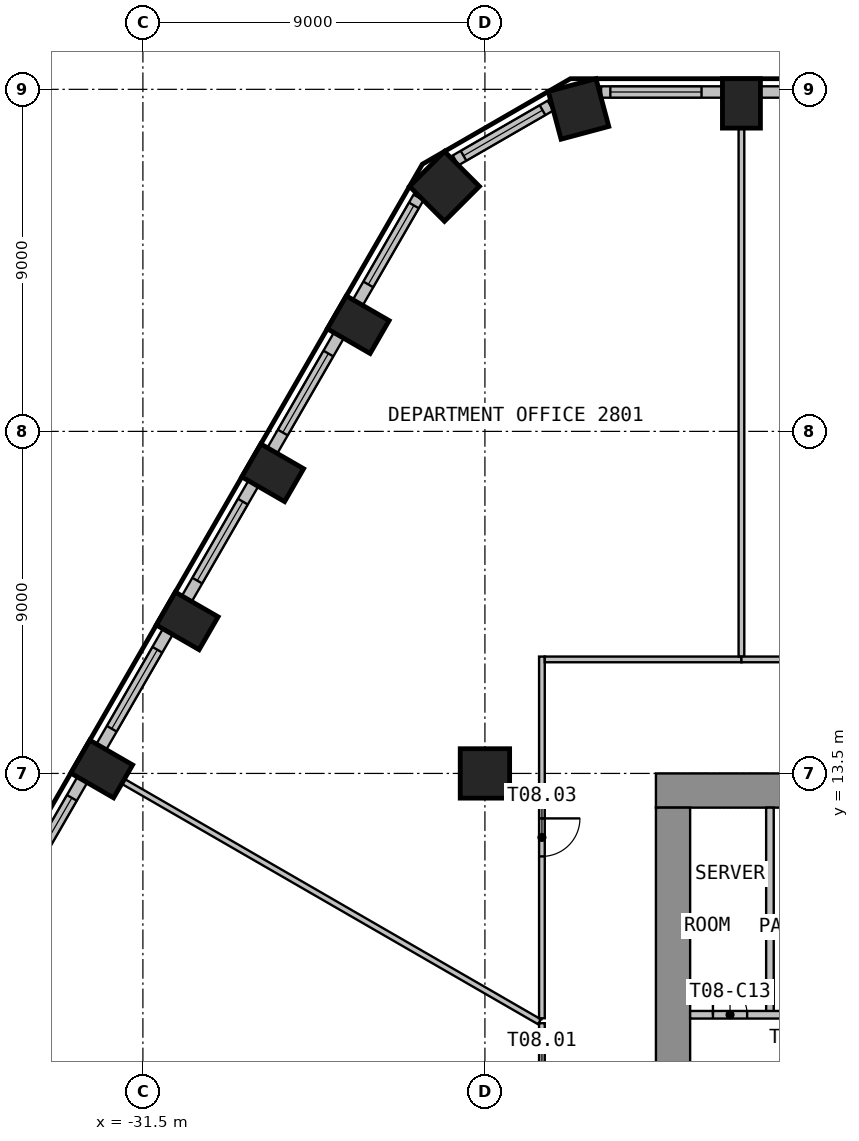
"""IFC4 building model, lengths in metres.
Left out: names, types, materials, properties, quantities, classifications, styles, units other than length and angle.
Written with IfcOpenShell. Run it as: python <this file> out.ifc"""

import sys

from ifc_helpers import new_model, si_unit, direction, frame, frame_2d, origin, origin_2d, place, context, subcontext, project, spatial, rectangle, circle, extrude, element, fill, save


model = new_model("IFC4")
c1 = context("Model", 3, precision=1e-05, world=origin(), true_north=direction((0.0, 1.0)))
c2 = subcontext(c1, "Body", "Model", "MODEL_VIEW")
j1 = project(units=[si_unit("LENGTHUNIT", "METRE"), si_unit("PLANEANGLEUNIT", "RADIAN")], contexts=[c1])
p1 = place(None, origin())
s1 = spatial("IfcSite", under=j1, at=p1, CompositionType="ELEMENT")
p2 = place(p1, origin())
s2 = spatial("IfcBuilding", under=s1, at=p2, CompositionType="ELEMENT")
p3 = place(p2, frame((0.0, 0.0, 116.4)))
s3 = spatial("IfcBuildingStorey", under=s2, at=p3, CompositionType="ELEMENT", Elevation=116.4)
p4 = place(p3, frame((-15.75, 31.13, 0.0), z_axis=(0.0, 0.0, 1.0), x_axis=(-1.0, 0.0, 0.0)))
e1 = element("IfcColumn", 1, at=p4, inside=s3, PredefinedType="COLUMN", context=c2, shape_type="SweptSolid", body=[
    extrude(rectangle(XDim=1.0, YDim=1.3, at=origin_2d()), origin(), (0.0, 0.0, 1.0), 3.525),
])
for number, where, z_axis, x_axis in (
    (2, (-20.037, 30.984, 0.0), (0.0, 0.0, 1.0), (-0.966, -0.259, 0.0)),
    (3, (-23.564, 28.947, 0.0), (0.0, 0.0, 1.0), (-0.707, -0.707, 0.0)),
):
    element("IfcColumn", number, at=place(p3, frame(where, z_axis=z_axis, x_axis=x_axis)), inside=s3, PredefinedType="COLUMN", context=c2, shape_type="SweptSolid", body=[
        extrude(rectangle(XDim=1.3, YDim=1.3, at=origin_2d()), origin(), (0.0, 0.0, 1.0), 3.525),
    ])
for number, where, z_axis, x_axis in (
    (4, (-25.834, 25.308, 0.0), (0.0, 0.0, 1.0), (-0.5, -0.866, 0.0)),
    (5, (-28.084, 21.411, 0.0), (0.0, 0.0, 1.0), (-0.5, -0.866, 0.0)),
    (6, (-30.334, 17.513, 0.0), (0.0, 0.0, 1.0), (-0.5, -0.866, 0.0)),
    (7, (-32.584, 13.616, 0.0), (0.0, 0.0, 1.0), (-0.5, -0.866, 0.0)),
):
    element("IfcColumn", number, at=place(p3, frame(where, z_axis=z_axis, x_axis=x_axis)), inside=s3, PredefinedType="COLUMN", context=c2, shape_type="SweptSolid", body=[
        extrude(rectangle(XDim=1.0, YDim=1.3, at=origin_2d()), origin(), (0.0, 0.0, 1.0), 3.525),
    ])
p5 = place(p3, frame((-22.5, 13.5, 0.0), z_axis=(0.0, 0.0, 1.0), x_axis=(1.0, 0.0, 0.0)))
e8 = element("IfcColumn", 8, at=p5, inside=s3, PredefinedType="COLUMN", context=c2, shape_type="SweptSolid", body=[
    extrude(circle(Radius=0.65, at=origin_2d()), origin(), (0.0, 0.0, 1.0), 3.525),
])
p6 = place(p3, frame((-11.75, 31.43, 0.0), z_axis=(0.0, 0.0, 1.0), x_axis=(-1.0, 0.0, 0.0)))
e9 = element("IfcWall", 9, at=p6, inside=s3, PredefinedType="SOLIDWALL", context=c2, shape_type="SweptSolid", body=[
    extrude(rectangle(XDim=3.499, YDim=0.3, at=frame_2d((1.75, 0.0))), origin(), (0.0, 0.0, 1.0), 3.525),
])
p7 = place(p6, frame((0.55, 0.0, 0.9)))
e10 = element("IfcOpeningElement", 10, at=p7, cuts=e9, PredefinedType="OPENING", context=c2, shape_type="SweptSolid", body=[
    extrude(rectangle(XDim=2.4, YDim=2.1, at=frame_2d((1.2, 1.05))), frame((0.0, 0.16, 0.0), z_axis=(0.0, -1.0, 0.0), x_axis=(1.0, 0.0, 0.0)), (0.0, 0.0, 1.0), 0.32),
])
p8 = place(p3, frame((-16.25, 31.43, 0.0), z_axis=(0.0, 0.0, 1.0), x_axis=(-1.0, 0.0, 0.0)))
e11 = element("IfcWall", 11, at=p8, inside=s3, PredefinedType="SOLIDWALL", context=c2, shape_type="SweptSolid", body=[
    extrude(rectangle(XDim=3.192, YDim=0.3, at=frame_2d((1.596, 0.0))), origin(), (0.0, 0.0, 1.0), 3.525),
])
p9 = place(p8, frame((0.55, 0.0, 0.9)))
e12 = element("IfcOpeningElement", 12, at=p9, cuts=e11, PredefinedType="OPENING", context=c2, shape_type="SweptSolid", body=[
    extrude(rectangle(XDim=2.4, YDim=2.1, at=frame_2d((1.2, 1.05))), frame((0.0, 0.16, 0.0), z_axis=(0.0, -1.0, 0.0), x_axis=(1.0, 0.0, 0.0)), (0.0, 0.0, 1.0), 0.32),
])
p10 = place(p3, frame((-20.774, 31.073, 0.0), z_axis=(0.0, 0.0, 1.0), x_axis=(-0.866053149362, -0.49995194017, 0.0)))
e13 = element("IfcWall", 13, at=p10, inside=s3, PredefinedType="SOLIDWALL", context=c2, shape_type="SweptSolid", body=[
    extrude(rectangle(XDim=2.885, YDim=0.3, at=frame_2d((1.443, 0.0))), origin(), (0.0, 0.0, 1.0), 3.525),
])
p11 = place(p10, frame((0.243, 0.0, 0.9)))
e14 = element("IfcOpeningElement", 14, at=p11, cuts=e13, PredefinedType="OPENING", context=c2, shape_type="SweptSolid", body=[
    extrude(rectangle(XDim=2.4, YDim=2.1, at=frame_2d((1.2, 1.05))), frame((0.0, 0.16, 0.0), z_axis=(0.0, -1.0, 0.0), x_axis=(1.0, 0.0, 0.0)), (0.0, 0.0, 1.0), 0.32),
])
p12 = place(p3, frame((-24.248, 28.656, 0.0), z_axis=(0.0, 0.0, 1.0), x_axis=(-0.500004907028, -0.866022570692, 0.0)))
e15 = element("IfcWall", 15, at=p12, inside=s3, PredefinedType="SOLIDWALL", context=c2, shape_type="SweptSolid", body=[
    extrude(rectangle(XDim=3.192, YDim=0.3, at=frame_2d((1.596, 0.0))), origin(), (0.0, 0.0, 1.0), 3.525),
])
p13 = place(p12, frame((0.243, 0.0, 0.9)))
e16 = element("IfcOpeningElement", 16, at=p13, cuts=e15, PredefinedType="OPENING", context=c2, shape_type="SweptSolid", body=[
    extrude(rectangle(XDim=2.4, YDim=2.1, at=frame_2d((1.2, 1.05))), frame((0.0, 0.16, 0.0), z_axis=(0.0, -1.0, 0.0), x_axis=(1.0, 0.0, 0.0)), (0.0, 0.0, 1.0), 0.32),
])
p14 = place(p3, frame((-26.344, 25.024, 0.0), z_axis=(0.0, 0.0, 1.0), x_axis=(-0.499996256241, -0.866027565234, 0.0)))
e17 = element("IfcWall", 17, at=p14, inside=s3, PredefinedType="SOLIDWALL", context=c2, shape_type="SweptSolid", body=[
    extrude(rectangle(XDim=3.499, YDim=0.3, at=frame_2d((1.75, 0.0))), origin(), (0.0, 0.0, 1.0), 3.525),
])
p15 = place(p14, frame((0.55, 0.0, 0.9)))
e18 = element("IfcOpeningElement", 18, at=p15, cuts=e17, PredefinedType="OPENING", context=c2, shape_type="SweptSolid", body=[
    extrude(rectangle(XDim=2.4, YDim=2.1, at=frame_2d((1.2, 1.05))), frame((0.0, 0.16, 0.0), z_axis=(0.0, -1.0, 0.0), x_axis=(1.0, 0.0, 0.0)), (0.0, 0.0, 1.0), 0.32),
])
p16 = place(p3, frame((-28.594, 21.127, 0.0), z_axis=(0.0, 0.0, 1.0), x_axis=(-0.499996256241, -0.866027565234, 0.0)))
e19 = element("IfcWall", 19, at=p16, inside=s3, PredefinedType="SOLIDWALL", context=c2, shape_type="SweptSolid", body=[
    extrude(rectangle(XDim=3.499, YDim=0.3, at=frame_2d((1.75, 0.0))), origin(), (0.0, 0.0, 1.0), 3.525),
])
p17 = place(p16, frame((0.55, 0.0, 0.9)))
e20 = element("IfcOpeningElement", 20, at=p17, cuts=e19, PredefinedType="OPENING", context=c2, shape_type="SweptSolid", body=[
    extrude(rectangle(XDim=2.4, YDim=2.1, at=frame_2d((1.2, 1.05))), frame((0.0, 0.16, 0.0), z_axis=(0.0, -1.0, 0.0), x_axis=(1.0, 0.0, 0.0)), (0.0, 0.0, 1.0), 0.32),
])
p18 = place(p3, frame((-30.844, 17.23, 0.0), z_axis=(0.0, 0.0, 1.0), x_axis=(-0.499996256241, -0.866027565234, 0.0)))
e21 = element("IfcWall", 21, at=p18, inside=s3, PredefinedType="SOLIDWALL", context=c2, shape_type="SweptSolid", body=[
    extrude(rectangle(XDim=3.499, YDim=0.3, at=frame_2d((1.75, 0.0))), origin(), (0.0, 0.0, 1.0), 3.525),
])
p19 = place(p18, frame((0.55, 0.0, 0.9)))
e22 = element("IfcOpeningElement", 22, at=p19, cuts=e21, PredefinedType="OPENING", context=c2, shape_type="SweptSolid", body=[
    extrude(rectangle(XDim=2.4, YDim=2.1, at=frame_2d((1.2, 1.05))), frame((0.0, 0.16, 0.0), z_axis=(0.0, -1.0, 0.0), x_axis=(1.0, 0.0, 0.0)), (0.0, 0.0, 1.0), 0.32),
])
p20 = place(p3, frame((-33.094, 13.333, 0.0), z_axis=(0.0, 0.0, 1.0), x_axis=(-0.499996256241, -0.866027565234, 0.0)))
e23 = element("IfcWall", 23, at=p20, inside=s3, PredefinedType="SOLIDWALL", context=c2, shape_type="SweptSolid", body=[
    extrude(rectangle(XDim=3.499, YDim=0.3, at=frame_2d((1.75, 0.0))), origin(), (0.0, 0.0, 1.0), 3.525),
])
p21 = place(p20, frame((0.55, 0.0, 0.9)))
e24 = element("IfcOpeningElement", 24, at=p21, cuts=e23, PredefinedType="OPENING", context=c2, shape_type="SweptSolid", body=[
    extrude(rectangle(XDim=2.4, YDim=2.1, at=frame_2d((1.2, 1.05))), frame((0.0, 0.16, 0.0), z_axis=(0.0, -1.0, 0.0), x_axis=(1.0, 0.0, 0.0)), (0.0, 0.0, 1.0), 0.32),
])
p22 = place(p3, frame((-18.0, 13.05, 0.0), z_axis=(0.0, 0.0, 1.0), x_axis=(1.0, 0.0, 0.0)))
e25 = element("IfcWall", 25, at=p22, inside=s3, PredefinedType="SHEAR", context=c2, shape_type="SweptSolid", body=[
    extrude(rectangle(XDim=36.0, YDim=0.9, at=frame_2d((18.0, 0.0))), origin(), (0.0, 0.0, 1.0), 3.525),
])
p23 = place(p22, frame((16.8, 0.0, 0.0)))
e26 = element("IfcOpeningElement", 26, at=p23, cuts=e25, PredefinedType="OPENING", context=c2, shape_type="SweptSolid", body=[
    extrude(rectangle(XDim=2.4, YDim=2.1, at=frame_2d((1.2, 1.05))), frame((0.0, 0.46, 0.0), z_axis=(0.0, -1.0, 0.0), x_axis=(1.0, 0.0, 0.0)), (0.0, 0.0, 1.0), 0.92),
])
p24 = place(p22, frame((5.55, 0.0, 0.0)))
e27 = element("IfcOpeningElement", 27, at=p24, cuts=e25, PredefinedType="OPENING", context=c2, shape_type="SweptSolid", body=[
    extrude(rectangle(XDim=1.2, YDim=2.1, at=frame_2d((0.6, 1.05))), frame((0.0, 0.46, 0.0), z_axis=(0.0, -1.0, 0.0), x_axis=(1.0, 0.0, 0.0)), (0.0, 0.0, 1.0), 0.92),
])
p25 = place(p22, frame((29.25, 0.0, 0.0)))
e28 = element("IfcOpeningElement", 28, at=p25, cuts=e25, PredefinedType="OPENING", context=c2, shape_type="SweptSolid", body=[
    extrude(rectangle(XDim=1.2, YDim=2.1, at=frame_2d((0.6, 1.05))), frame((0.0, 0.46, 0.0), z_axis=(0.0, -1.0, 0.0), x_axis=(1.0, 0.0, 0.0)), (0.0, 0.0, 1.0), 0.92),
])
p26 = place(p3, frame((-17.55, -12.6, 0.0), z_axis=(0.0, 0.0, 1.0), x_axis=(0.0, 1.0, 0.0)))
e29 = element("IfcWall", 29, at=p26, inside=s3, PredefinedType="SHEAR", context=c2, shape_type="SweptSolid", body=[
    extrude(rectangle(XDim=25.2, YDim=0.9, at=frame_2d((12.6, 0.0))), origin(), (0.0, 0.0, 1.0), 3.525),
])
p27 = place(p26, frame((11.4, 0.0, 0.0)))
e30 = element("IfcOpeningElement", 30, at=p27, cuts=e29, PredefinedType="OPENING", context=c2, shape_type="SweptSolid", body=[
    extrude(rectangle(XDim=2.4, YDim=2.1, at=frame_2d((1.2, 1.05))), frame((0.0, 0.46, 0.0), z_axis=(0.0, -1.0, 0.0), x_axis=(1.0, 0.0, 0.0)), (0.0, 0.0, 1.0), 0.92),
])
p28 = place(p3, frame((-15.0, 7.15, 0.0), z_axis=(0.0, 0.0, 1.0), x_axis=(0.0, 1.0, 0.0)))
e31 = element("IfcWall", 31, at=p28, inside=s3, PredefinedType="PARTITIONING", context=c2, shape_type="SweptSolid", body=[
    extrude(rectangle(XDim=5.45, YDim=0.2, at=frame_2d((2.725, 0.0))), origin(), (0.0, 0.0, 1.0), 3.525),
])
p29 = place(p3, frame((-17.1, 7.15, 0.0), z_axis=(0.0, 0.0, 1.0), x_axis=(1.0, 0.0, 0.0)))
e32 = element("IfcWall", 32, at=p29, inside=s3, PredefinedType="PARTITIONING", context=c2, shape_type="SweptSolid", body=[
    extrude(rectangle(XDim=4.2, YDim=0.2, at=frame_2d((2.1, 0.0))), origin(), (0.0, 0.0, 1.0), 3.525),
])
p30 = place(p29, frame((0.6, 0.0, 0.0)))
e33 = element("IfcOpeningElement", 33, at=p30, cuts=e32, PredefinedType="OPENING", context=c2, shape_type="SweptSolid", body=[
    extrude(rectangle(XDim=0.9, YDim=2.1, at=frame_2d((0.45, 1.05))), frame((0.0, 0.11, 0.0), z_axis=(0.0, -1.0, 0.0), x_axis=(1.0, 0.0, 0.0)), (0.0, 0.0, 1.0), 0.22),
])
p31 = place(p29, frame((2.7, 0.0, 0.0)))
e34 = element("IfcOpeningElement", 34, at=p31, cuts=e32, PredefinedType="OPENING", context=c2, shape_type="SweptSolid", body=[
    extrude(rectangle(XDim=0.9, YDim=2.1, at=frame_2d((0.45, 1.05))), frame((0.0, 0.11, 0.0), z_axis=(0.0, -1.0, 0.0), x_axis=(1.0, 0.0, 0.0)), (0.0, 0.0, 1.0), 0.22),
])
p32 = place(p3, frame((-32.004, 13.281, 0.0), z_axis=(0.0, 0.0, 1.0), x_axis=(0.866023362995, -0.500003534735, 0.0)))
e35 = element("IfcWall", 35, at=p32, inside=s3, PredefinedType="PARTITIONING", context=c2, shape_type="SweptSolid", body=[
    extrude(rectangle(XDim=12.631, YDim=0.15, at=frame_2d((6.316, 0.0))), origin(), (0.0, 0.0, 1.0), 3.525),
])
p33 = place(p3, frame((-21.0, 6.928, 0.0), z_axis=(0.0, 0.0, 1.0), x_axis=(0.0, -1.0, 0.0)))
e36 = element("IfcWall", 36, at=p33, inside=s3, PredefinedType="PARTITIONING", context=c2, shape_type="SweptSolid", body=[
    extrude(rectangle(XDim=4.115, YDim=0.15, at=frame_2d((2.058, 0.0))), origin(), (0.0, 0.0, 1.0), 3.525),
])
p34 = place(p33, frame((1.058, 0.0, 0.0)))
e37 = element("IfcOpeningElement", 37, at=p34, cuts=e36, PredefinedType="OPENING", context=c2, shape_type="SweptSolid", body=[
    extrude(rectangle(XDim=1.0, YDim=2.1, at=frame_2d((0.5, 1.05))), frame((0.0, 0.085, 0.0), z_axis=(0.0, -1.0, 0.0), x_axis=(1.0, 0.0, 0.0)), (0.0, 0.0, 1.0), 0.17),
])
p35 = place(p3, frame((-21.0, 16.575, 0.0), z_axis=(0.0, 0.0, 1.0), x_axis=(0.0, -1.0, 0.0)))
e38 = element("IfcWall", 38, at=p35, inside=s3, PredefinedType="PARTITIONING", context=c2, shape_type="SweptSolid", body=[
    extrude(rectangle(XDim=9.517, YDim=0.15, at=frame_2d((4.758, 0.0))), origin(), (0.0, 0.0, 1.0), 3.525),
])
p36 = place(p35, frame((4.259, 0.0, 0.0)))
e39 = element("IfcOpeningElement", 39, at=p36, cuts=e38, PredefinedType="OPENING", context=c2, shape_type="SweptSolid", body=[
    extrude(rectangle(XDim=1.0, YDim=2.1, at=frame_2d((0.5, 1.05))), frame((0.0, 0.085, 0.0), z_axis=(0.0, -1.0, 0.0), x_axis=(1.0, 0.0, 0.0)), (0.0, 0.0, 1.0), 0.17),
])
p37 = place(p3, frame((-15.75, 16.5, 0.0), z_axis=(0.0, 0.0, 1.0), x_axis=(-1.0, 0.0, 0.0)))
e40 = element("IfcWall", 40, at=p37, inside=s3, PredefinedType="PARTITIONING", context=c2, shape_type="SweptSolid", body=[
    extrude(rectangle(XDim=5.175, YDim=0.15, at=frame_2d((2.587, 0.0))), origin(), (0.0, 0.0, 1.0), 3.525),
])
p38 = place(p3, frame((-15.75, 30.46, 0.0), z_axis=(0.0, 0.0, 1.0), x_axis=(0.0, -1.0, 0.0)))
e41 = element("IfcWall", 41, at=p38, inside=s3, PredefinedType="PARTITIONING", context=c2, shape_type="SweptSolid", body=[
    extrude(rectangle(XDim=13.885, YDim=0.15, at=frame_2d((6.942, 0.0))), origin(), (0.0, 0.0, 1.0), 3.525),
])
p39 = place(p3, frame((-2.25, 16.5, 0.0), z_axis=(0.0, 0.0, 1.0), x_axis=(-1.0, 0.0, 0.0)))
e42 = element("IfcWall", 42, at=p39, inside=s3, PredefinedType="PARTITIONING", context=c2, shape_type="SweptSolid", body=[
    extrude(rectangle(XDim=13.5, YDim=0.15, at=frame_2d((6.75, 0.0))), origin(), (0.0, 0.0, 1.0), 3.525),
])
p40 = place(p39, frame((6.25, 0.0, 0.0)))
e43 = element("IfcOpeningElement", 43, at=p40, cuts=e42, PredefinedType="OPENING", context=c2, shape_type="SweptSolid", body=[
    extrude(rectangle(XDim=1.0, YDim=2.1, at=frame_2d((0.5, 1.05))), frame((0.0, 0.085, 0.0), z_axis=(0.0, -1.0, 0.0), x_axis=(1.0, 0.0, 0.0)), (0.0, 0.0, 1.0), 0.17),
])
p41 = place(p9, origin())
e44 = element("IfcWindow", 44, at=p41, inside=s3, PartitioningType="SINGLE_PANEL", PredefinedType="WINDOW", context=c2, shape_type="SweptSolid", body=[
    extrude(rectangle(XDim=2.4, YDim=2.1, at=frame_2d((1.2, 1.05))), frame((0.0, 0.03, 0.0), z_axis=(0.0, -1.0, 0.0), x_axis=(1.0, 0.0, 0.0)), (0.0, 0.0, 1.0), 0.06),
])
fill(e12, e44)
p42 = place(p11, origin())
e45 = element("IfcWindow", 45, at=p42, inside=s3, PartitioningType="SINGLE_PANEL", PredefinedType="WINDOW", context=c2, shape_type="SweptSolid", body=[
    extrude(rectangle(XDim=2.4, YDim=2.1, at=frame_2d((1.2, 1.05))), frame((0.0, 0.03, 0.0), z_axis=(0.0, -1.0, 0.0), x_axis=(1.0, 0.0, 0.0)), (0.0, 0.0, 1.0), 0.06),
])
fill(e14, e45)
p43 = place(p13, origin())
e46 = element("IfcWindow", 46, at=p43, inside=s3, PartitioningType="SINGLE_PANEL", PredefinedType="WINDOW", context=c2, shape_type="SweptSolid", body=[
    extrude(rectangle(XDim=2.4, YDim=2.1, at=frame_2d((1.2, 1.05))), frame((0.0, 0.03, 0.0), z_axis=(0.0, -1.0, 0.0), x_axis=(1.0, 0.0, 0.0)), (0.0, 0.0, 1.0), 0.06),
])
fill(e16, e46)
p44 = place(p15, origin())
e47 = element("IfcWindow", 47, at=p44, inside=s3, PartitioningType="SINGLE_PANEL", PredefinedType="WINDOW", context=c2, shape_type="SweptSolid", body=[
    extrude(rectangle(XDim=2.4, YDim=2.1, at=frame_2d((1.2, 1.05))), frame((0.0, 0.03, 0.0), z_axis=(0.0, -1.0, 0.0), x_axis=(1.0, 0.0, 0.0)), (0.0, 0.0, 1.0), 0.06),
])
fill(e18, e47)
p45 = place(p17, origin())
e48 = element("IfcWindow", 48, at=p45, inside=s3, PartitioningType="SINGLE_PANEL", PredefinedType="WINDOW", context=c2, shape_type="SweptSolid", body=[
    extrude(rectangle(XDim=2.4, YDim=2.1, at=frame_2d((1.2, 1.05))), frame((0.0, 0.03, 0.0), z_axis=(0.0, -1.0, 0.0), x_axis=(1.0, 0.0, 0.0)), (0.0, 0.0, 1.0), 0.06),
])
fill(e20, e48)
p46 = place(p19, origin())
e49 = element("IfcWindow", 49, at=p46, inside=s3, PartitioningType="SINGLE_PANEL", PredefinedType="WINDOW", context=c2, shape_type="SweptSolid", body=[
    extrude(rectangle(XDim=2.4, YDim=2.1, at=frame_2d((1.2, 1.05))), frame((0.0, 0.03, 0.0), z_axis=(0.0, -1.0, 0.0), x_axis=(1.0, 0.0, 0.0)), (0.0, 0.0, 1.0), 0.06),
])
fill(e22, e49)
p47 = place(p21, origin())
e50 = element("IfcWindow", 50, at=p47, inside=s3, PartitioningType="SINGLE_PANEL", PredefinedType="WINDOW", context=c2, shape_type="SweptSolid", body=[
    extrude(rectangle(XDim=2.4, YDim=2.1, at=frame_2d((1.2, 1.05))), frame((0.0, 0.03, 0.0), z_axis=(0.0, -1.0, 0.0), x_axis=(1.0, 0.0, 0.0)), (0.0, 0.0, 1.0), 0.06),
])
fill(e24, e50)
p48 = place(p30, origin())
e51 = element("IfcDoor", 51, at=p48, inside=s3, OperationType="SINGLE_SWING_LEFT", PredefinedType="DOOR", context=c2, shape_type="SweptSolid", body=[
    extrude(rectangle(XDim=0.9, YDim=2.1, at=frame_2d((0.45, 1.05))), frame((0.0, 0.025, 0.0), z_axis=(0.0, -1.0, 0.0), x_axis=(1.0, 0.0, 0.0)), (0.0, 0.0, 1.0), 0.05),
])
fill(e33, e51)
p49 = place(p36, origin())
e52 = element("IfcDoor", 52, at=p49, inside=s3, OperationType="SINGLE_SWING_RIGHT", PredefinedType="DOOR", context=c2, shape_type="SweptSolid", body=[
    extrude(rectangle(XDim=1.0, YDim=2.1, at=frame_2d((0.5, 1.05))), frame((0.0, 0.025, 0.0), z_axis=(0.0, -1.0, 0.0), x_axis=(1.0, 0.0, 0.0)), (0.0, 0.0, 1.0), 0.05),
])
fill(e39, e52)
save(model, sys.argv[1])
